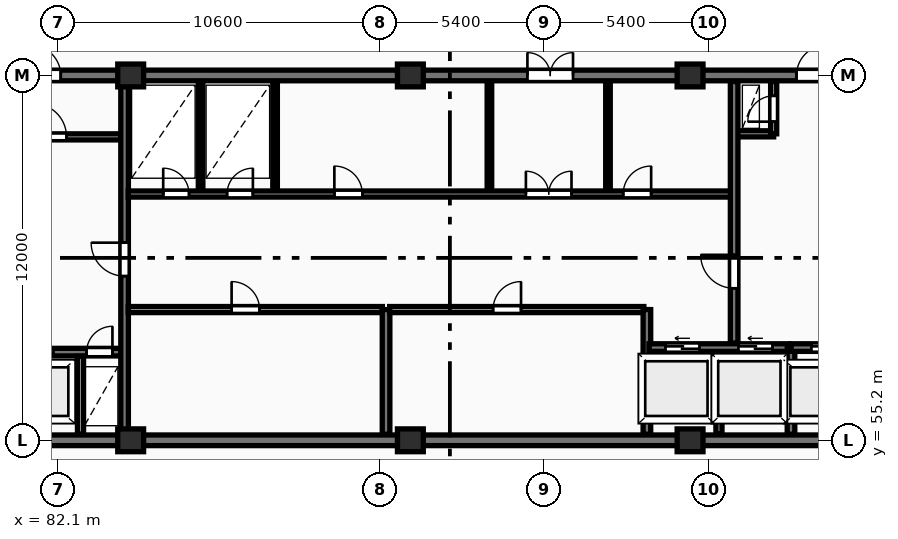
"""IFC4 building model, lengths in metres.
Left out: names, types, materials, properties, quantities, classifications, styles, units other than length and angle.
Written with IfcOpenShell. Run it as: python <this file> out.ifc"""

import sys

from ifc_helpers import new_model, si_unit, direction, frame, frame_2d, origin, origin_2d, place, context, subcontext, project, spatial, rectangle, extrude, element, fill, save


model = new_model("IFC4")
c1 = context("Model", 3, precision=1e-05, world=origin(), true_north=direction((0.0, 1.0)))
c2 = subcontext(c1, "Body", "Model", "MODEL_VIEW")
j1 = project(units=[si_unit("LENGTHUNIT", "METRE"), si_unit("PLANEANGLEUNIT", "RADIAN")], contexts=[c1])
p1 = place(None, origin())
s1 = spatial("IfcSite", under=j1, at=p1, CompositionType="ELEMENT")
p2 = place(p1, origin())
s2 = spatial("IfcBuilding", under=s1, at=p2, CompositionType="ELEMENT")
p3 = place(p2, frame((0.0, 0.0, 207.6)))
s3 = spatial("IfcBuildingStorey", under=s2, at=p3, CompositionType="ELEMENT", Elevation=207.6)
for number, where, z_axis, x_axis in (
    (1, (84.5, 55.2, 0.0), (0.0, 0.0, 1.0), (1.0, 0.0, 0.0)),
    (2, (84.5, 67.2, 0.0), (0.0, 0.0, 1.0), (1.0, 0.0, 0.0)),
    (3, (93.7, 55.2, 0.0), (0.0, 0.0, 1.0), (1.0, 0.0, 0.0)),
    (4, (93.7, 67.2, 0.0), (0.0, 0.0, 1.0), (1.0, 0.0, 0.0)),
    (5, (102.9, 55.2, 0.0), (0.0, 0.0, 1.0), (1.0, 0.0, 0.0)),
    (6, (102.9, 67.2, 0.0), (0.0, 0.0, 1.0), (1.0, 0.0, 0.0)),
):
    element("IfcColumn", number, at=place(p3, frame(where, z_axis=z_axis, x_axis=x_axis)), inside=s3, PredefinedType="COLUMN", context=c2, shape_type="SweptSolid", body=[
        extrude(rectangle(XDim=0.85, YDim=0.75, at=origin_2d()), origin(), (0.0, 0.0, 1.0), 3.25),
    ])
p4 = place(p3, frame((75.95, 55.2, 0.0), z_axis=(0.0, 0.0, 1.0), x_axis=(1.0, 0.0, 0.0)))
e7 = element("IfcWall", 7, at=p4, inside=s3, PredefinedType="SHEAR", context=c2, shape_type="SweptSolid", body=[
    extrude(rectangle(XDim=36.3, YDim=0.35, at=frame_2d((18.15, 0.0))), origin(), (0.0, 0.0, 1.0), 3.25),
])
p5 = place(p3, frame((75.95, 67.2, 0.0), z_axis=(0.0, 0.0, 1.0), x_axis=(1.0, 0.0, 0.0)))
e8 = element("IfcWall", 8, at=p5, inside=s3, PredefinedType="SHEAR", context=c2, shape_type="SweptSolid", body=[
    extrude(rectangle(XDim=36.3, YDim=0.35, at=frame_2d((18.15, 0.0))), origin(), (0.0, 0.0, 1.0), 3.25),
])
p6 = place(p5, frame((5.25, 0.0, 0.0)))
e9 = element("IfcOpeningElement", 9, at=p6, cuts=e8, PredefinedType="OPENING", context=c2, shape_type="SweptSolid", body=[
    extrude(rectangle(XDim=1.0, YDim=2.15, at=frame_2d((0.5, 1.075))), frame((0.0, 0.185, 0.0), z_axis=(0.0, -1.0, 0.0), x_axis=(1.0, 0.0, 0.0)), (0.0, 0.0, 1.0), 0.37),
])
p7 = place(p5, frame((21.6, 0.0, 0.0)))
e10 = element("IfcOpeningElement", 10, at=p7, cuts=e8, PredefinedType="OPENING", context=c2, shape_type="SweptSolid", body=[
    extrude(rectangle(XDim=1.5, YDim=2.2, at=frame_2d((0.75, 1.1))), frame((0.0, 0.185, 0.0), z_axis=(0.0, -1.0, 0.0), x_axis=(1.0, 0.0, 0.0)), (0.0, 0.0, 1.0), 0.37),
])
p8 = place(p5, frame((30.45, 0.0, 0.0)))
e11 = element("IfcOpeningElement", 11, at=p8, cuts=e8, PredefinedType="OPENING", context=c2, shape_type="SweptSolid", body=[
    extrude(rectangle(XDim=1.0, YDim=2.15, at=frame_2d((0.5, 1.075))), frame((0.0, 0.185, 0.0), z_axis=(0.0, -1.0, 0.0), x_axis=(1.0, 0.0, 0.0)), (0.0, 0.0, 1.0), 0.37),
])
p9 = place(p3, frame((79.79, 58.1, 0.0), z_axis=(0.0, 0.0, 1.0), x_axis=(1.0, 0.0, 0.0)))
e12 = element("IfcWall", 12, at=p9, inside=s3, PredefinedType="SHEAR", context=c2, shape_type="SweptSolid", body=[
    extrude(rectangle(XDim=4.39, YDim=0.25, at=frame_2d((2.195, 0.0))), origin(), (0.0, 0.0, 1.0), 3.25),
])
p10 = place(p9, frame((1.05, 0.0, 0.0)))
e13 = element("IfcOpeningElement", 13, at=p10, cuts=e12, PredefinedType="OPENING", context=c2, shape_type="SweptSolid", body=[
    extrude(rectangle(XDim=1.12, YDim=2.12, at=frame_2d((0.56, 1.06))), frame((0.0, 0.135, 0.0), z_axis=(0.0, -1.0, 0.0), x_axis=(1.0, 0.0, 0.0)), (0.0, 0.0, 1.0), 0.27),
])
p11 = place(p9, frame((3.26, 0.0, 0.0)))
e14 = element("IfcOpeningElement", 14, at=p11, cuts=e12, PredefinedType="OPENING", context=c2, shape_type="SweptSolid", body=[
    extrude(rectangle(XDim=0.85, YDim=2.05, at=frame_2d((0.425, 1.025))), frame((0.0, 0.135, 0.0), z_axis=(0.0, -1.0, 0.0), x_axis=(1.0, 0.0, 0.0)), (0.0, 0.0, 1.0), 0.27),
])
p12 = place(p3, frame((82.85, 55.4, 0.0), z_axis=(0.0, 0.0, 1.0), x_axis=(0.0, 1.0, 0.0)))
e15 = element("IfcWall", 15, at=p12, inside=s3, PredefinedType="PARTITIONING", context=c2, shape_type="SweptSolid", body=[
    extrude(rectangle(XDim=2.56, YDim=0.2, at=frame_2d((1.28, 0.0))), origin(), (0.0, 0.0, 1.0), 2.97),
])
p13 = place(p3, frame((79.79, 65.18, 0.0), z_axis=(0.0, 0.0, 1.0), x_axis=(1.0, 0.0, 0.0)))
e16 = element("IfcWall", 16, at=p13, inside=s3, PredefinedType="PARTITIONING", context=c2, shape_type="SweptSolid", body=[
    extrude(rectangle(XDim=4.39, YDim=0.2, at=frame_2d((2.195, 0.0))), origin(), (0.0, 0.0, 1.0), 2.97),
])
p14 = place(p13, frame((1.5, 0.0, 0.0)))
e17 = element("IfcOpeningElement", 17, at=p14, cuts=e16, PredefinedType="OPENING", context=c2, shape_type="SweptSolid", body=[
    extrude(rectangle(XDim=1.1, YDim=2.1, at=frame_2d((0.55, 1.05))), frame((0.0, 0.11, 0.0), z_axis=(0.0, -1.0, 0.0), x_axis=(1.0, 0.0, 0.0)), (0.0, 0.0, 1.0), 0.22),
])
p15 = place(p3, frame((84.3, 55.4, 0.0), z_axis=(0.0, 0.0, 1.0), x_axis=(0.0, 1.0, 0.0)))
e18 = element("IfcWall", 18, at=p15, inside=s3, PredefinedType="SHEAR", context=c2, shape_type="SweptSolid", body=[
    extrude(rectangle(XDim=11.6, YDim=0.25, at=frame_2d((5.8, 0.0))), origin(), (0.0, 0.0, 1.0), 3.25),
])
p16 = place(p15, frame((5.2, 0.0, 0.0)))
e19 = element("IfcOpeningElement", 19, at=p16, cuts=e18, PredefinedType="OPENING", context=c2, shape_type="SweptSolid", body=[
    extrude(rectangle(XDim=1.1, YDim=2.1, at=frame_2d((0.55, 1.05))), frame((0.0, 0.135, 0.0), z_axis=(0.0, -1.0, 0.0), x_axis=(1.0, 0.0, 0.0)), (0.0, 0.0, 1.0), 0.27),
])
p17 = place(p3, frame((84.42, 59.5, 0.0), z_axis=(0.0, 0.0, 1.0), x_axis=(1.0, 0.0, 0.0)))
e20 = element("IfcWall", 20, at=p17, inside=s3, PredefinedType="PARTITIONING", context=c2, shape_type="SweptSolid", body=[
    extrude(rectangle(XDim=8.36, YDim=0.2, at=frame_2d((4.18, 0.0))), origin(), (0.0, 0.0, 1.0), 2.97),
])
p18 = place(p17, frame((3.4, 0.0, 0.0)))
e21 = element("IfcOpeningElement", 21, at=p18, cuts=e20, PredefinedType="OPENING", context=c2, shape_type="SweptSolid", body=[
    extrude(rectangle(XDim=0.92, YDim=2.08, at=frame_2d((0.46, 1.04))), frame((0.0, 0.11, 0.0), z_axis=(0.0, -1.0, 0.0), x_axis=(1.0, 0.0, 0.0)), (0.0, 0.0, 1.0), 0.22),
])
p19 = place(p3, frame((92.9, 55.4, 0.0), z_axis=(0.0, 0.0, 1.0), x_axis=(0.0, 1.0, 0.0)))
e22 = element("IfcWall", 22, at=p19, inside=s3, PredefinedType="SHEAR", context=c2, shape_type="SweptSolid", body=[
    extrude(rectangle(XDim=4.1, YDim=0.25, at=frame_2d((2.05, 0.0))), origin(), (0.0, 0.0, 1.0), 3.25),
])
p20 = place(p3, frame((93.02, 59.5, 0.0), z_axis=(0.0, 0.0, 1.0), x_axis=(1.0, 0.0, 0.0)))
e23 = element("IfcWall", 23, at=p20, inside=s3, PredefinedType="PARTITIONING", context=c2, shape_type="SweptSolid", body=[
    extrude(rectangle(XDim=8.36, YDim=0.2, at=frame_2d((4.18, 0.0))), origin(), (0.0, 0.0, 1.0), 2.97),
])
p21 = place(p20, frame((3.4, 0.0, 0.0)))
e24 = element("IfcOpeningElement", 24, at=p21, cuts=e23, PredefinedType="OPENING", context=c2, shape_type="SweptSolid", body=[
    extrude(rectangle(XDim=0.92, YDim=2.08, at=frame_2d((0.46, 1.04))), frame((0.0, 0.11, 0.0), z_axis=(0.0, -1.0, 0.0), x_axis=(1.0, 0.0, 0.0)), (0.0, 0.0, 1.0), 0.22),
])
p22 = place(p3, frame((101.48, 55.4, 0.0), z_axis=(0.0, 0.0, 1.0), x_axis=(0.0, 1.0, 0.0)))
e25 = element("IfcWall", 25, at=p22, inside=s3, PredefinedType="SHEAR", context=c2, shape_type="SweptSolid", body=[
    extrude(rectangle(XDim=4.1, YDim=0.25, at=frame_2d((2.05, 0.0))), origin(), (0.0, 0.0, 1.0), 3.25),
])
p23 = place(p3, frame((103.85, 55.4, 0.0), z_axis=(0.0, 0.0, 1.0), x_axis=(0.0, 1.0, 0.0)))
e26 = element("IfcWall", 26, at=p23, inside=s3, PredefinedType="PARTITIONING", context=c2, shape_type="SweptSolid", body=[
    extrude(rectangle(XDim=2.72, YDim=0.2, at=frame_2d((1.36, 0.0))), origin(), (0.0, 0.0, 1.0), 2.97),
])
p24 = place(p3, frame((101.55, 58.25, 0.0), z_axis=(0.0, 0.0, 1.0), x_axis=(1.0, 0.0, 0.0)))
e27 = element("IfcWall", 27, at=p24, inside=s3, PredefinedType="SHEAR", context=c2, shape_type="SweptSolid", body=[
    extrude(rectangle(XDim=4.6, YDim=0.25, at=frame_2d((2.3, 0.0))), origin(), (0.0, 0.0, 1.0), 3.25),
])
p25 = place(p24, frame((0.54, 0.0, 0.0)))
e28 = element("IfcOpeningElement", 28, at=p25, cuts=e27, PredefinedType="OPENING", context=c2, shape_type="SweptSolid", body=[
    extrude(rectangle(XDim=1.12, YDim=2.12, at=frame_2d((0.56, 1.06))), frame((0.0, 0.135, 0.0), z_axis=(0.0, -1.0, 0.0), x_axis=(1.0, 0.0, 0.0)), (0.0, 0.0, 1.0), 0.27),
])
p26 = place(p24, frame((2.94, 0.0, 0.0)))
e29 = element("IfcOpeningElement", 29, at=p26, cuts=e27, PredefinedType="OPENING", context=c2, shape_type="SweptSolid", body=[
    extrude(rectangle(XDim=1.12, YDim=2.12, at=frame_2d((0.56, 1.06))), frame((0.0, 0.135, 0.0), z_axis=(0.0, -1.0, 0.0), x_axis=(1.0, 0.0, 0.0)), (0.0, 0.0, 1.0), 0.27),
])
p27 = place(p3, frame((106.22, 55.4, 0.0), z_axis=(0.0, 0.0, 1.0), x_axis=(0.0, 1.0, 0.0)))
e30 = element("IfcWall", 30, at=p27, inside=s3, PredefinedType="SHEAR", context=c2, shape_type="SweptSolid", body=[
    extrude(rectangle(XDim=2.85, YDim=0.25, at=frame_2d((1.425, 0.0))), origin(), (0.0, 0.0, 1.0), 3.25),
])
p28 = place(p3, frame((106.22, 58.25, 0.0), z_axis=(0.0, 0.0, 1.0), x_axis=(1.0, 0.0, 0.0)))
e31 = element("IfcWall", 31, at=p28, inside=s3, PredefinedType="SHEAR", context=c2, shape_type="SweptSolid", body=[
    extrude(rectangle(XDim=2.46, YDim=0.25, at=frame_2d((1.23, 0.0))), origin(), (0.0, 0.0, 1.0), 3.25),
])
p29 = place(p28, frame((0.67, 0.0, 0.0)))
e32 = element("IfcOpeningElement", 32, at=p29, cuts=e31, PredefinedType="OPENING", context=c2, shape_type="SweptSolid", body=[
    extrude(rectangle(XDim=1.12, YDim=2.12, at=frame_2d((0.56, 1.06))), frame((0.0, 0.135, 0.0), z_axis=(0.0, -1.0, 0.0), x_axis=(1.0, 0.0, 0.0)), (0.0, 0.0, 1.0), 0.27),
])
for number, where, z_axis, x_axis in (
    (33, (86.8, 63.4, 0.0), (0.0, 0.0, 1.0), (0.0, 1.0, 0.0)),
    (34, (89.25, 63.4, 0.0), (0.0, 0.0, 1.0), (0.0, 1.0, 0.0)),
    (35, (96.3, 63.4, 0.0), (0.0, 0.0, 1.0), (0.0, 1.0, 0.0)),
    (36, (100.2, 63.4, 0.0), (0.0, 0.0, 1.0), (0.0, 1.0, 0.0)),
):
    element("IfcWall", number, at=place(p3, frame(where, z_axis=z_axis, x_axis=x_axis)), inside=s3, PredefinedType="PARTITIONING", context=c2, shape_type="SweptSolid", body=[
        extrude(rectangle(XDim=3.6, YDim=0.15, at=frame_2d((1.8, 0.0))), origin(), (0.0, 0.0, 1.0), 2.97),
    ])
p30 = place(p3, frame((84.42, 63.3, 0.0), z_axis=(0.0, 0.0, 1.0), x_axis=(1.0, 0.0, 0.0)))
e37 = element("IfcWall", 37, at=p30, inside=s3, PredefinedType="PARTITIONING", context=c2, shape_type="SweptSolid", body=[
    extrude(rectangle(XDim=19.83, YDim=0.2, at=frame_2d((9.915, 0.0))), origin(), (0.0, 0.0, 1.0), 2.97),
])
p31 = place(p30, frame((1.15, 0.0, 0.0)))
e38 = element("IfcOpeningElement", 38, at=p31, cuts=e37, PredefinedType="OPENING", context=c2, shape_type="SweptSolid", body=[
    extrude(rectangle(XDim=0.85, YDim=2.05, at=frame_2d((0.425, 1.025))), frame((0.0, 0.11, 0.0), z_axis=(0.0, -1.0, 0.0), x_axis=(1.0, 0.0, 0.0)), (0.0, 0.0, 1.0), 0.22),
])
p32 = place(p30, frame((3.25, 0.0, 0.0)))
e39 = element("IfcOpeningElement", 39, at=p32, cuts=e37, PredefinedType="OPENING", context=c2, shape_type="SweptSolid", body=[
    extrude(rectangle(XDim=0.85, YDim=2.05, at=frame_2d((0.425, 1.025))), frame((0.0, 0.11, 0.0), z_axis=(0.0, -1.0, 0.0), x_axis=(1.0, 0.0, 0.0)), (0.0, 0.0, 1.0), 0.22),
])
p33 = place(p30, frame((13.08, 0.0, 0.0)))
e40 = element("IfcOpeningElement", 40, at=p33, cuts=e37, PredefinedType="OPENING", context=c2, shape_type="SweptSolid", body=[
    extrude(rectangle(XDim=1.5, YDim=2.2, at=frame_2d((0.75, 1.1))), frame((0.0, 0.11, 0.0), z_axis=(0.0, -1.0, 0.0), x_axis=(1.0, 0.0, 0.0)), (0.0, 0.0, 1.0), 0.22),
])
p34 = place(p30, frame((6.78, 0.0, 0.0)))
e41 = element("IfcOpeningElement", 41, at=p34, cuts=e37, PredefinedType="OPENING", context=c2, shape_type="SweptSolid", body=[
    extrude(rectangle(XDim=0.92, YDim=2.08, at=frame_2d((0.46, 1.04))), frame((0.0, 0.11, 0.0), z_axis=(0.0, -1.0, 0.0), x_axis=(1.0, 0.0, 0.0)), (0.0, 0.0, 1.0), 0.22),
])
p35 = place(p30, frame((16.28, 0.0, 0.0)))
e42 = element("IfcOpeningElement", 42, at=p35, cuts=e37, PredefinedType="OPENING", context=c2, shape_type="SweptSolid", body=[
    extrude(rectangle(XDim=0.92, YDim=2.08, at=frame_2d((0.46, 1.04))), frame((0.0, 0.11, 0.0), z_axis=(0.0, -1.0, 0.0), x_axis=(1.0, 0.0, 0.0)), (0.0, 0.0, 1.0), 0.22),
])
p36 = place(p3, frame((104.45, 65.28, 0.0), z_axis=(0.0, 0.0, 1.0), x_axis=(1.0, 0.0, 0.0)))
e43 = element("IfcWall", 43, at=p36, inside=s3, PredefinedType="PARTITIONING", context=c2, shape_type="SweptSolid", body=[
    extrude(rectangle(XDim=1.2, YDim=0.2, at=frame_2d((0.6, 0.0))), origin(), (0.0, 0.0, 1.0), 2.97),
])
p37 = place(p3, frame((105.65, 65.28, 0.0), z_axis=(0.0, 0.0, 1.0), x_axis=(0.0, 1.0, 0.0)))
e44 = element("IfcWall", 44, at=p37, inside=s3, PredefinedType="PARTITIONING", context=c2, shape_type="SweptSolid", body=[
    extrude(rectangle(XDim=1.72, YDim=0.2, at=frame_2d((0.86, 0.0))), origin(), (0.0, 0.0, 1.0), 2.97),
])
p38 = place(p37, frame((0.4, 0.0, 0.0)))
e45 = element("IfcOpeningElement", 45, at=p38, cuts=e44, PredefinedType="OPENING", context=c2, shape_type="SweptSolid", body=[
    extrude(rectangle(XDim=0.85, YDim=2.05, at=frame_2d((0.425, 1.025))), frame((0.0, 0.11, 0.0), z_axis=(0.0, -1.0, 0.0), x_axis=(1.0, 0.0, 0.0)), (0.0, 0.0, 1.0), 0.22),
])
p39 = place(p3, frame((104.35, 58.4, 0.0), z_axis=(0.0, 0.0, 1.0), x_axis=(0.0, 1.0, 0.0)))
e46 = element("IfcWall", 46, at=p39, inside=s3, PredefinedType="SHEAR", context=c2, shape_type="SweptSolid", body=[
    extrude(rectangle(XDim=8.6, YDim=0.25, at=frame_2d((4.3, 0.0))), origin(), (0.0, 0.0, 1.0), 3.25),
])
p40 = place(p39, frame((1.8, 0.0, 0.0)))
e47 = element("IfcOpeningElement", 47, at=p40, cuts=e46, PredefinedType="OPENING", context=c2, shape_type="SweptSolid", body=[
    extrude(rectangle(XDim=1.1, YDim=2.1, at=frame_2d((0.55, 1.05))), frame((0.0, 0.135, 0.0), z_axis=(0.0, -1.0, 0.0), x_axis=(1.0, 0.0, 0.0)), (0.0, 0.0, 1.0), 0.27),
])
p41 = place(p6, origin())
e48 = element("IfcDoor", 48, at=p41, inside=s3, OperationType="SINGLE_SWING_LEFT", PredefinedType="DOOR", context=c2, shape_type="SweptSolid", body=[
    extrude(rectangle(XDim=1.0, YDim=2.15, at=frame_2d((0.5, 1.075))), frame((0.0, 0.025, 0.0), z_axis=(0.0, -1.0, 0.0), x_axis=(1.0, 0.0, 0.0)), (0.0, 0.0, 1.0), 0.05),
])
fill(e9, e48)
p42 = place(p7, origin())
e49 = element("IfcDoor", 49, at=p42, inside=s3, OperationType="DOUBLE_DOOR_SINGLE_SWING", PredefinedType="DOOR", context=c2, shape_type="SweptSolid", body=[
    extrude(rectangle(XDim=1.5, YDim=2.2, at=frame_2d((0.75, 1.1))), frame((0.0, 0.025, 0.0), z_axis=(0.0, -1.0, 0.0), x_axis=(1.0, 0.0, 0.0)), (0.0, 0.0, 1.0), 0.05),
])
fill(e10, e49)
p43 = place(p8, origin())
e50 = element("IfcDoor", 50, at=p43, inside=s3, OperationType="SINGLE_SWING_RIGHT", PredefinedType="DOOR", context=c2, shape_type="SweptSolid", body=[
    extrude(rectangle(XDim=1.0, YDim=2.15, at=frame_2d((0.5, 1.075))), frame((0.0, 0.025, 0.0), z_axis=(0.0, -1.0, 0.0), x_axis=(1.0, 0.0, 0.0)), (0.0, 0.0, 1.0), 0.05),
])
fill(e11, e50)
p44 = place(p10, origin())
e51 = element("IfcDoor", 51, at=p44, inside=s3, OperationType="SLIDING_TO_LEFT", PredefinedType="DOOR", context=c2, shape_type="SweptSolid", body=[
    extrude(rectangle(XDim=1.12, YDim=2.12, at=frame_2d((0.56, 1.06))), frame((0.0, 0.025, 0.0), z_axis=(0.0, -1.0, 0.0), x_axis=(1.0, 0.0, 0.0)), (0.0, 0.0, 1.0), 0.05),
])
fill(e13, e51)
p45 = place(p11, origin())
e52 = element("IfcDoor", 52, at=p45, inside=s3, OperationType="SINGLE_SWING_RIGHT", PredefinedType="DOOR", context=c2, shape_type="SweptSolid", body=[
    extrude(rectangle(XDim=0.85, YDim=2.05, at=frame_2d((0.425, 1.025))), frame((0.0, 0.025, 0.0), z_axis=(0.0, -1.0, 0.0), x_axis=(1.0, 0.0, 0.0)), (0.0, 0.0, 1.0), 0.05),
])
fill(e14, e52)
p46 = place(p14, origin())
e53 = element("IfcDoor", 53, at=p46, inside=s3, OperationType="SINGLE_SWING_LEFT", PredefinedType="DOOR", context=c2, shape_type="SweptSolid", body=[
    extrude(rectangle(XDim=1.1, YDim=2.1, at=frame_2d((0.55, 1.05))), frame((0.0, 0.025, 0.0), z_axis=(0.0, -1.0, 0.0), x_axis=(1.0, 0.0, 0.0)), (0.0, 0.0, 1.0), 0.05),
])
fill(e17, e53)
p47 = place(p16, origin())
e54 = element("IfcDoor", 54, at=p47, inside=s3, OperationType="SINGLE_SWING_RIGHT", PredefinedType="DOOR", context=c2, shape_type="SweptSolid", body=[
    extrude(rectangle(XDim=1.1, YDim=2.1, at=frame_2d((0.55, 1.05))), frame((0.0, 0.025, 0.0), z_axis=(0.0, -1.0, 0.0), x_axis=(1.0, 0.0, 0.0)), (0.0, 0.0, 1.0), 0.05),
])
fill(e19, e54)
p48 = place(p18, origin())
e55 = element("IfcDoor", 55, at=p48, inside=s3, OperationType="SINGLE_SWING_LEFT", PredefinedType="DOOR", context=c2, shape_type="SweptSolid", body=[
    extrude(rectangle(XDim=0.92, YDim=2.08, at=frame_2d((0.46, 1.04))), frame((0.0, 0.025, 0.0), z_axis=(0.0, -1.0, 0.0), x_axis=(1.0, 0.0, 0.0)), (0.0, 0.0, 1.0), 0.05),
])
fill(e21, e55)
p49 = place(p21, origin())
e56 = element("IfcDoor", 56, at=p49, inside=s3, OperationType="SINGLE_SWING_RIGHT", PredefinedType="DOOR", context=c2, shape_type="SweptSolid", body=[
    extrude(rectangle(XDim=0.92, YDim=2.08, at=frame_2d((0.46, 1.04))), frame((0.0, 0.025, 0.0), z_axis=(0.0, -1.0, 0.0), x_axis=(1.0, 0.0, 0.0)), (0.0, 0.0, 1.0), 0.05),
])
fill(e24, e56)
p50 = place(p25, origin())
e57 = element("IfcDoor", 57, at=p50, inside=s3, OperationType="SLIDING_TO_LEFT", PredefinedType="DOOR", context=c2, shape_type="SweptSolid", body=[
    extrude(rectangle(XDim=1.12, YDim=2.12, at=frame_2d((0.56, 1.06))), frame((0.0, 0.025, 0.0), z_axis=(0.0, -1.0, 0.0), x_axis=(1.0, 0.0, 0.0)), (0.0, 0.0, 1.0), 0.05),
])
fill(e28, e57)
p51 = place(p26, origin())
e58 = element("IfcDoor", 58, at=p51, inside=s3, OperationType="SLIDING_TO_LEFT", PredefinedType="DOOR", context=c2, shape_type="SweptSolid", body=[
    extrude(rectangle(XDim=1.12, YDim=2.12, at=frame_2d((0.56, 1.06))), frame((0.0, 0.025, 0.0), z_axis=(0.0, -1.0, 0.0), x_axis=(1.0, 0.0, 0.0)), (0.0, 0.0, 1.0), 0.05),
])
fill(e29, e58)
p52 = place(p29, origin())
e59 = element("IfcDoor", 59, at=p52, inside=s3, OperationType="SLIDING_TO_RIGHT", PredefinedType="DOOR", context=c2, shape_type="SweptSolid", body=[
    extrude(rectangle(XDim=1.12, YDim=2.12, at=frame_2d((0.56, 1.06))), frame((0.0, 0.025, 0.0), z_axis=(0.0, -1.0, 0.0), x_axis=(1.0, 0.0, 0.0)), (0.0, 0.0, 1.0), 0.05),
])
fill(e32, e59)
p53 = place(p31, origin())
e60 = element("IfcDoor", 60, at=p53, inside=s3, OperationType="SINGLE_SWING_LEFT", PredefinedType="DOOR", context=c2, shape_type="SweptSolid", body=[
    extrude(rectangle(XDim=0.85, YDim=2.05, at=frame_2d((0.425, 1.025))), frame((0.0, 0.025, 0.0), z_axis=(0.0, -1.0, 0.0), x_axis=(1.0, 0.0, 0.0)), (0.0, 0.0, 1.0), 0.05),
])
fill(e38, e60)
p54 = place(p32, origin())
e61 = element("IfcDoor", 61, at=p54, inside=s3, OperationType="SINGLE_SWING_RIGHT", PredefinedType="DOOR", context=c2, shape_type="SweptSolid", body=[
    extrude(rectangle(XDim=0.85, YDim=2.05, at=frame_2d((0.425, 1.025))), frame((0.0, 0.025, 0.0), z_axis=(0.0, -1.0, 0.0), x_axis=(1.0, 0.0, 0.0)), (0.0, 0.0, 1.0), 0.05),
])
fill(e39, e61)
p55 = place(p33, origin())
e62 = element("IfcDoor", 62, at=p55, inside=s3, OperationType="DOUBLE_DOOR_SINGLE_SWING", PredefinedType="DOOR", context=c2, shape_type="SweptSolid", body=[
    extrude(rectangle(XDim=1.5, YDim=2.2, at=frame_2d((0.75, 1.1))), frame((0.0, 0.025, 0.0), z_axis=(0.0, -1.0, 0.0), x_axis=(1.0, 0.0, 0.0)), (0.0, 0.0, 1.0), 0.05),
])
fill(e40, e62)
p56 = place(p34, origin())
e63 = element("IfcDoor", 63, at=p56, inside=s3, OperationType="SINGLE_SWING_LEFT", PredefinedType="DOOR", context=c2, shape_type="SweptSolid", body=[
    extrude(rectangle(XDim=0.92, YDim=2.08, at=frame_2d((0.46, 1.04))), frame((0.0, 0.025, 0.0), z_axis=(0.0, -1.0, 0.0), x_axis=(1.0, 0.0, 0.0)), (0.0, 0.0, 1.0), 0.05),
])
fill(e41, e63)
p57 = place(p35, origin())
e64 = element("IfcDoor", 64, at=p57, inside=s3, OperationType="SINGLE_SWING_RIGHT", PredefinedType="DOOR", context=c2, shape_type="SweptSolid", body=[
    extrude(rectangle(XDim=0.92, YDim=2.08, at=frame_2d((0.46, 1.04))), frame((0.0, 0.025, 0.0), z_axis=(0.0, -1.0, 0.0), x_axis=(1.0, 0.0, 0.0)), (0.0, 0.0, 1.0), 0.05),
])
fill(e42, e64)
p58 = place(p38, origin())
e65 = element("IfcDoor", 65, at=p58, inside=s3, OperationType="SINGLE_SWING_LEFT", PredefinedType="DOOR", context=c2, shape_type="SweptSolid", body=[
    extrude(rectangle(XDim=0.85, YDim=2.05, at=frame_2d((0.425, 1.025))), frame((0.0, 0.025, 0.0), z_axis=(0.0, -1.0, 0.0), x_axis=(1.0, 0.0, 0.0)), (0.0, 0.0, 1.0), 0.05),
])
fill(e45, e65)
p59 = place(p40, origin())
e66 = element("IfcDoor", 66, at=p59, inside=s3, OperationType="SINGLE_SWING_RIGHT", PredefinedType="DOOR", context=c2, shape_type="SweptSolid", body=[
    extrude(rectangle(XDim=1.1, YDim=2.1, at=frame_2d((0.55, 1.05))), frame((0.0, 0.025, 0.0), z_axis=(0.0, -1.0, 0.0), x_axis=(1.0, 0.0, 0.0)), (0.0, 0.0, 1.0), 0.05),
])
fill(e47, e66)
save(model, sys.argv[1])
